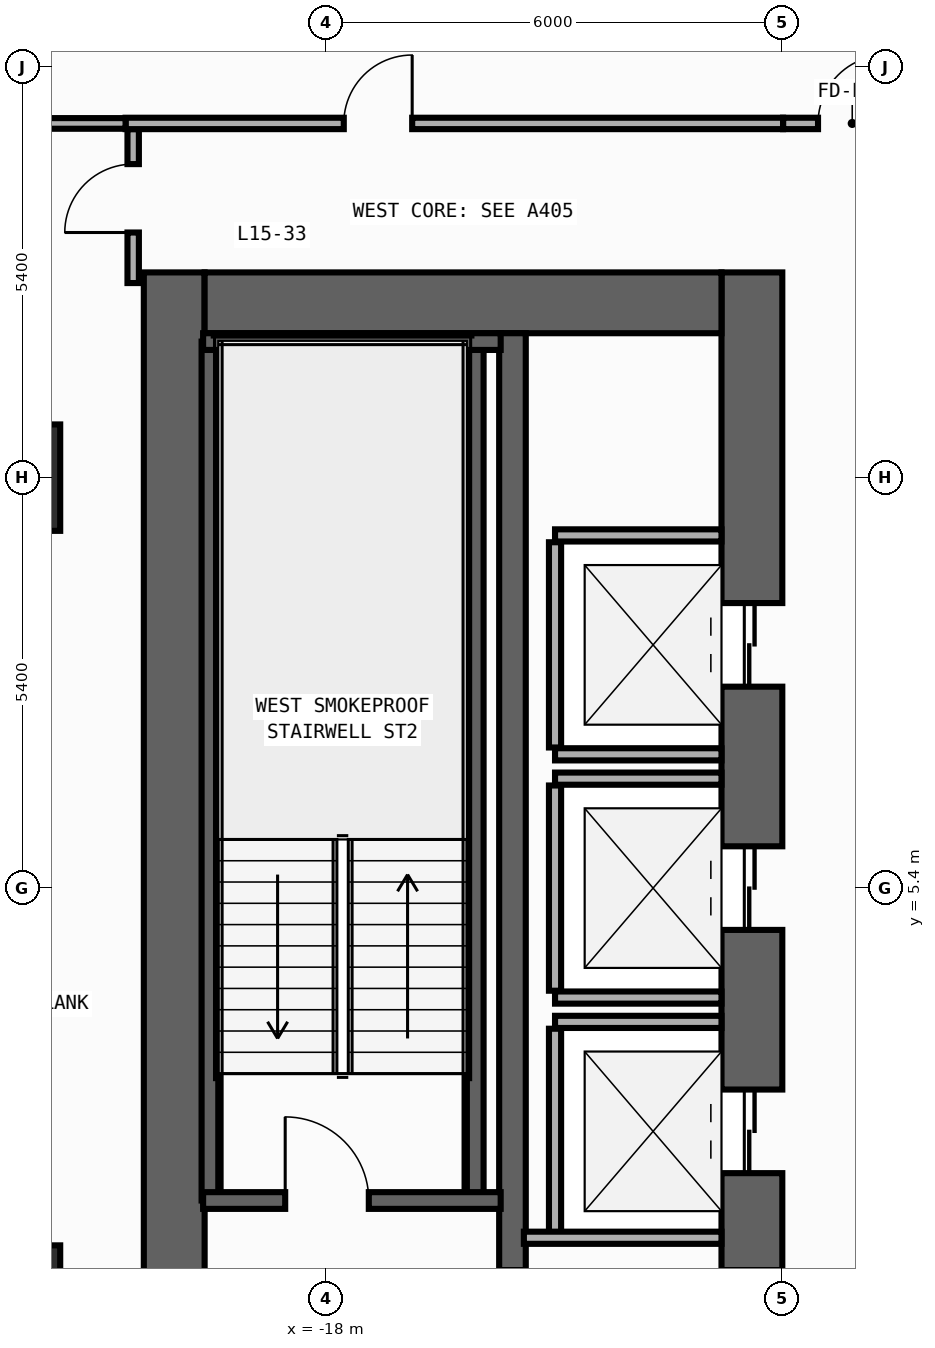
"""IFC4 building model, lengths in metres.
Left out: names, types, materials, properties, quantities, classifications, styles, units other than length and angle.
Written with IfcOpenShell. Run it as: python <this file> out.ifc"""

import sys

from ifc_helpers import new_model, si_unit, direction, frame, frame_2d, origin, origin_2d, place, context, subcontext, project, spatial, rectangle, extrude, element, fill, save


model = new_model("IFC4")
c1 = context("Model", 3, precision=1e-05, world=origin(), true_north=direction((0.0, 1.0)))
c2 = subcontext(c1, "Body", "Model", "MODEL_VIEW")
j1 = project(units=[si_unit("LENGTHUNIT", "METRE"), si_unit("PLANEANGLEUNIT", "RADIAN")], contexts=[c1])
p1 = place(None, origin())
s1 = spatial("IfcSite", under=j1, at=p1, CompositionType="ELEMENT")
p2 = place(p1, origin())
s2 = spatial("IfcBuilding", under=s1, at=p2, CompositionType="ELEMENT")
p3 = place(p2, frame((0.0, 0.0, 63.8)))
s3 = spatial("IfcBuildingStorey", under=s2, at=p3, CompositionType="ELEMENT", Elevation=63.8)
p4 = place(p3, frame((-20.0, -13.5, 0.0), z_axis=(0.0, 0.0, 1.0), x_axis=(0.0, 1.0, 0.0)))
e1 = element("IfcWall", 1, at=p4, inside=s3, PredefinedType="SHEAR", context=c2, shape_type="SweptSolid", body=[
    extrude(rectangle(XDim=27.0, YDim=0.8, at=frame_2d((13.5, 0.0))), origin(), (0.0, 0.0, 1.0), 3.94),
])
p5 = place(p3, frame((-12.4, -13.5, 0.0), z_axis=(0.0, 0.0, 1.0), x_axis=(0.0, 1.0, 0.0)))
e2 = element("IfcWall", 2, at=p5, inside=s3, PredefinedType="SHEAR", context=c2, shape_type="SweptSolid", body=[
    extrude(rectangle(XDim=27.0, YDim=0.8, at=frame_2d((13.5, 0.0))), origin(), (0.0, 0.0, 1.0), 3.94),
])
p6 = place(p5, frame((21.55, 0.0, 0.0)))
e3 = element("IfcOpeningElement", 3, at=p6, cuts=e2, PredefinedType="OPENING", context=c2, shape_type="SweptSolid", body=[
    extrude(rectangle(XDim=1.1, YDim=2.2, at=frame_2d((0.55, 1.1))), frame((0.0, 0.41, 0.0), z_axis=(0.0, -1.0, 0.0), x_axis=(1.0, 0.0, 0.0)), (0.0, 0.0, 1.0), 0.82),
])
p7 = place(p5, frame((18.35, 0.0, 0.0)))
e4 = element("IfcOpeningElement", 4, at=p7, cuts=e2, PredefinedType="OPENING", context=c2, shape_type="SweptSolid", body=[
    extrude(rectangle(XDim=1.1, YDim=2.2, at=frame_2d((0.55, 1.1))), frame((0.0, 0.41, 0.0), z_axis=(0.0, -1.0, 0.0), x_axis=(1.0, 0.0, 0.0)), (0.0, 0.0, 1.0), 0.82),
])
p8 = place(p5, frame((15.15, 0.0, 0.0)))
e5 = element("IfcOpeningElement", 5, at=p8, cuts=e2, PredefinedType="OPENING", context=c2, shape_type="SweptSolid", body=[
    extrude(rectangle(XDim=1.1, YDim=2.2, at=frame_2d((0.55, 1.1))), frame((0.0, 0.41, 0.0), z_axis=(0.0, -1.0, 0.0), x_axis=(1.0, 0.0, 0.0)), (0.0, 0.0, 1.0), 0.82),
])
p9 = place(p5, frame((10.35, 0.0, 0.0)))
e6 = element("IfcOpeningElement", 6, at=p9, cuts=e2, PredefinedType="OPENING", context=c2, shape_type="SweptSolid", body=[
    extrude(rectangle(XDim=1.1, YDim=2.2, at=frame_2d((0.55, 1.1))), frame((0.0, 0.41, 0.0), z_axis=(0.0, -1.0, 0.0), x_axis=(1.0, 0.0, 0.0)), (0.0, 0.0, 1.0), 0.82),
])
p10 = place(p5, frame((7.15, 0.0, 0.0)))
e7 = element("IfcOpeningElement", 7, at=p10, cuts=e2, PredefinedType="OPENING", context=c2, shape_type="SweptSolid", body=[
    extrude(rectangle(XDim=1.1, YDim=2.2, at=frame_2d((0.55, 1.1))), frame((0.0, 0.41, 0.0), z_axis=(0.0, -1.0, 0.0), x_axis=(1.0, 0.0, 0.0)), (0.0, 0.0, 1.0), 0.82),
])
p11 = place(p5, frame((3.95, 0.0, 0.0)))
e8 = element("IfcOpeningElement", 8, at=p11, cuts=e2, PredefinedType="OPENING", context=c2, shape_type="SweptSolid", body=[
    extrude(rectangle(XDim=1.1, YDim=2.2, at=frame_2d((0.55, 1.1))), frame((0.0, 0.41, 0.0), z_axis=(0.0, -1.0, 0.0), x_axis=(1.0, 0.0, 0.0)), (0.0, 0.0, 1.0), 0.82),
])
p12 = place(p5, frame((12.725, 0.0, 0.0)))
e9 = element("IfcOpeningElement", 9, at=p12, cuts=e2, PredefinedType="OPENING", context=c2, shape_type="SweptSolid", body=[
    extrude(rectangle(XDim=1.15, YDim=2.2, at=frame_2d((0.575, 1.1))), frame((0.0, 0.41, 0.0), z_axis=(0.0, -1.0, 0.0), x_axis=(1.0, 0.0, 0.0)), (0.0, 0.0, 1.0), 0.82),
])
p13 = place(p5, frame((1.625, 0.0, 0.0)))
e10 = element("IfcOpeningElement", 10, at=p13, cuts=e2, PredefinedType="OPENING", context=c2, shape_type="SweptSolid", body=[
    extrude(rectangle(XDim=0.85, YDim=2.1, at=frame_2d((0.425, 1.05))), frame((0.0, 0.41, 0.0), z_axis=(0.0, -1.0, 0.0), x_axis=(1.0, 0.0, 0.0)), (0.0, 0.0, 1.0), 0.82),
])
p14 = place(p3, frame((-19.6, 13.1, 0.0), z_axis=(0.0, 0.0, 1.0), x_axis=(1.0, 0.0, 0.0)))
e11 = element("IfcWall", 11, at=p14, inside=s3, PredefinedType="SHEAR", context=c2, shape_type="SweptSolid", body=[
    extrude(rectangle(XDim=6.8, YDim=0.8, at=frame_2d((3.4, 0.0))), origin(), (0.0, 0.0, 1.0), 3.94),
])
p15 = place(p3, frame((-15.55, -12.7, 0.0), z_axis=(0.0, 0.0, 1.0), x_axis=(0.0, 1.0, 0.0)))
e12 = element("IfcWall", 12, at=p15, inside=s3, PredefinedType="SHEAR", context=c2, shape_type="SweptSolid", body=[
    extrude(rectangle(XDim=25.4, YDim=0.35, at=frame_2d((12.7, 0.0))), origin(), (0.0, 0.0, 1.0), 3.94),
])
p16 = place(p15, frame((11.925, 0.0, 0.0)))
e13 = element("IfcOpeningElement", 13, at=p16, cuts=e12, PredefinedType="OPENING", context=c2, shape_type="SweptSolid", body=[
    extrude(rectangle(XDim=1.15, YDim=2.2, at=frame_2d((0.575, 1.1))), frame((0.0, 0.185, 0.0), z_axis=(0.0, -1.0, 0.0), x_axis=(1.0, 0.0, 0.0)), (0.0, 0.0, 1.0), 0.37),
])
p17 = place(p15, frame((0.825, 0.0, 0.0)))
e14 = element("IfcOpeningElement", 14, at=p17, cuts=e12, PredefinedType="OPENING", context=c2, shape_type="SweptSolid", body=[
    extrude(rectangle(XDim=0.85, YDim=2.1, at=frame_2d((0.425, 1.05))), frame((0.0, 0.185, 0.0), z_axis=(0.0, -1.0, 0.0), x_axis=(1.0, 0.0, 0.0)), (0.0, 0.0, 1.0), 0.37),
])
for number, where, z_axis, x_axis in (
    (15, (-16.04, 1.29, 0.0), (0.0, 0.0, 1.0), (0.0, 1.0, 0.0)),
    (16, (-19.53, 1.29, 0.0), (0.0, 0.0, 1.0), (0.0, 1.0, 0.0)),
):
    element("IfcWall", number, at=place(p3, frame(where, z_axis=z_axis, x_axis=x_axis)), inside=s3, PredefinedType="SHEAR", context=c2, shape_type="SweptSolid", body=[
        extrude(rectangle(XDim=11.3, YDim=0.22, at=frame_2d((5.65, 0.0))), origin(), (0.0, 0.0, 1.0), 3.94),
    ])
p18 = place(p3, frame((-19.62, 12.59, 0.0), z_axis=(0.0, 0.0, 1.0), x_axis=(1.0, 0.0, 0.0)))
e17 = element("IfcWall", 17, at=p18, inside=s3, PredefinedType="SHEAR", context=c2, shape_type="SweptSolid", body=[
    extrude(rectangle(XDim=3.915, YDim=0.22, at=frame_2d((1.958, 0.0))), origin(), (0.0, 0.0, 1.0), 3.94),
])
p19 = place(p3, frame((-19.62, 1.29, 0.0), z_axis=(0.0, 0.0, 1.0), x_axis=(1.0, 0.0, 0.0)))
e18 = element("IfcWall", 18, at=p19, inside=s3, PredefinedType="SHEAR", context=c2, shape_type="SweptSolid", body=[
    extrude(rectangle(XDim=3.915, YDim=0.22, at=frame_2d((1.958, 0.0))), origin(), (0.0, 0.0, 1.0), 3.94),
])
p20 = place(p19, frame((1.08, 0.0, 0.0)))
e19 = element("IfcOpeningElement", 19, at=p20, cuts=e18, PredefinedType="OPENING", context=c2, shape_type="SweptSolid", body=[
    extrude(rectangle(XDim=1.1, YDim=2.2, at=frame_2d((0.55, 1.1))), frame((0.0, 0.12, 0.0), z_axis=(0.0, -1.0, 0.0), x_axis=(1.0, 0.0, 0.0)), (0.0, 0.0, 1.0), 0.24),
])
for number, where, z_axis, x_axis in (
    (20, (-22.2, 0.0, 0.0), (0.0, 0.0, 1.0), (1.0, 0.0, 0.0)),
    (21, (-22.2, 10.8, 0.0), (0.0, 0.0, 1.0), (1.0, 0.0, 0.0)),
):
    element("IfcColumn", number, at=place(p3, frame(where, z_axis=z_axis, x_axis=x_axis)), inside=s3, PredefinedType="COLUMN", context=c2, shape_type="SweptSolid", body=[
        extrude(rectangle(XDim=1.4, YDim=1.4, at=origin_2d()), origin(), (0.0, 0.0, 1.0), 4.2),
    ])
for number, where, z_axis, x_axis in (
    (22, (-14.99, 7.16, 0.0), (0.0, 0.0, 1.0), (1.0, 0.0, 0.0)),
    (23, (-14.99, 10.04, 0.0), (0.0, 0.0, 1.0), (1.0, 0.0, 0.0)),
):
    element("IfcWall", number, at=place(p3, frame(where, z_axis=z_axis, x_axis=x_axis)), inside=s3, PredefinedType="STANDARD", context=c2, shape_type="SweptSolid", body=[
        extrude(rectangle(XDim=2.19, YDim=0.16, at=frame_2d((1.095, 0.0))), origin(), (0.0, 0.0, 1.0), 3.94),
    ])
p21 = place(p3, frame((-14.99, 7.25, 0.0), z_axis=(0.0, 0.0, 1.0), x_axis=(0.0, 1.0, 0.0)))
e24 = element("IfcWall", 24, at=p21, inside=s3, PredefinedType="STANDARD", context=c2, shape_type="SweptSolid", body=[
    extrude(rectangle(XDim=2.7, YDim=0.16, at=frame_2d((1.35, 0.0))), origin(), (0.0, 0.0, 1.0), 3.94),
])
for number, where, z_axis, x_axis in (
    (25, (-14.99, 3.96, 0.0), (0.0, 0.0, 1.0), (1.0, 0.0, 0.0)),
    (26, (-14.99, 6.84, 0.0), (0.0, 0.0, 1.0), (1.0, 0.0, 0.0)),
):
    element("IfcWall", number, at=place(p3, frame(where, z_axis=z_axis, x_axis=x_axis)), inside=s3, PredefinedType="STANDARD", context=c2, shape_type="SweptSolid", body=[
        extrude(rectangle(XDim=2.19, YDim=0.16, at=frame_2d((1.095, 0.0))), origin(), (0.0, 0.0, 1.0), 3.94),
    ])
p22 = place(p3, frame((-14.99, 4.05, 0.0), z_axis=(0.0, 0.0, 1.0), x_axis=(0.0, 1.0, 0.0)))
e27 = element("IfcWall", 27, at=p22, inside=s3, PredefinedType="STANDARD", context=c2, shape_type="SweptSolid", body=[
    extrude(rectangle(XDim=2.7, YDim=0.16, at=frame_2d((1.35, 0.0))), origin(), (0.0, 0.0, 1.0), 3.94),
])
p23 = place(p3, frame((-14.99, 3.64, 0.0), z_axis=(0.0, 0.0, 1.0), x_axis=(1.0, 0.0, 0.0)))
e28 = element("IfcWall", 28, at=p23, inside=s3, PredefinedType="STANDARD", context=c2, shape_type="SweptSolid", body=[
    extrude(rectangle(XDim=2.19, YDim=0.16, at=frame_2d((1.095, 0.0))), origin(), (0.0, 0.0, 1.0), 3.94),
])
p24 = place(p3, frame((-14.99, 0.85, 0.0), z_axis=(0.0, 0.0, 1.0), x_axis=(0.0, 1.0, 0.0)))
e29 = element("IfcWall", 29, at=p24, inside=s3, PredefinedType="STANDARD", context=c2, shape_type="SweptSolid", body=[
    extrude(rectangle(XDim=2.7, YDim=0.16, at=frame_2d((1.35, 0.0))), origin(), (0.0, 0.0, 1.0), 3.94),
])
p25 = place(p3, frame((-15.4, 0.8, 0.0), z_axis=(0.0, 0.0, 1.0), x_axis=(1.0, 0.0, 0.0)))
e30 = element("IfcWall", 30, at=p25, inside=s3, PredefinedType="STANDARD", context=c2, shape_type="SweptSolid", body=[
    extrude(rectangle(XDim=2.6, YDim=0.16, at=frame_2d((1.3, 0.0))), origin(), (0.0, 0.0, 1.0), 3.94),
])
p26 = place(p3, frame((-11.99, 15.46, 0.0), z_axis=(0.0, 0.0, 1.0), x_axis=(1.0, 0.0, 0.0)))
e31 = element("IfcWall", 31, at=p26, inside=s3, PredefinedType="PARTITIONING", context=c2, shape_type="SweptSolid", body=[
    extrude(rectangle(XDim=1.98, YDim=0.15, at=frame_2d((0.99, 0.0))), origin(), (0.0, 0.0, 1.0), 3.94),
])
p27 = place(p26, frame((0.46, 0.0, 0.0)))
e32 = element("IfcOpeningElement", 32, at=p27, cuts=e31, PredefinedType="OPENING", context=c2, shape_type="SweptSolid", body=[
    extrude(rectangle(XDim=0.9, YDim=2.15, at=frame_2d((0.45, 1.075))), frame((0.0, 0.085, 0.0), z_axis=(0.0, -1.0, 0.0), x_axis=(1.0, 0.0, 0.0)), (0.0, 0.0, 1.0), 0.17),
])
p28 = place(p3, frame((-20.54, 13.36, 0.0), z_axis=(0.0, 0.0, 1.0), x_axis=(0.0, 1.0, 0.0)))
e33 = element("IfcWall", 33, at=p28, inside=s3, PredefinedType="PARTITIONING", context=c2, shape_type="SweptSolid", body=[
    extrude(rectangle(XDim=2.025, YDim=0.15, at=frame_2d((1.012, 0.0))), origin(), (0.0, 0.0, 1.0), 3.94),
])
p29 = place(p28, frame((0.665, 0.0, 0.0)))
e34 = element("IfcOpeningElement", 34, at=p29, cuts=e33, PredefinedType="OPENING", context=c2, shape_type="SweptSolid", body=[
    extrude(rectangle(XDim=0.9, YDim=2.15, at=frame_2d((0.45, 1.075))), frame((0.0, 0.085, 0.0), z_axis=(0.0, -1.0, 0.0), x_axis=(1.0, 0.0, 0.0)), (0.0, 0.0, 1.0), 0.17),
])
p30 = place(p3, frame((-20.64, 15.46, 0.0), z_axis=(0.0, 0.0, 1.0), x_axis=(1.0, 0.0, 0.0)))
e35 = element("IfcWall", 35, at=p30, inside=s3, PredefinedType="PARTITIONING", context=c2, shape_type="SweptSolid", body=[
    extrude(rectangle(XDim=8.65, YDim=0.15, at=frame_2d((4.325, 0.0))), origin(), (0.0, 0.0, 1.0), 3.94),
])
p31 = place(p30, frame((2.871, 0.0, 0.0)))
e36 = element("IfcOpeningElement", 36, at=p31, cuts=e35, PredefinedType="OPENING", context=c2, shape_type="SweptSolid", body=[
    extrude(rectangle(XDim=0.9, YDim=2.15, at=frame_2d((0.45, 1.075))), frame((0.0, 0.085, 0.0), z_axis=(0.0, -1.0, 0.0), x_axis=(1.0, 0.0, 0.0)), (0.0, 0.0, 1.0), 0.17),
])
p32 = place(p3, frame((-24.055, 15.46, 0.0), z_axis=(0.0, 0.0, 1.0), x_axis=(1.0, 0.0, 0.0)))
e37 = element("IfcWall", 37, at=p32, inside=s3, PredefinedType="PARTITIONING", context=c2, shape_type="SweptSolid", body=[
    extrude(rectangle(XDim=3.415, YDim=0.14, at=frame_2d((1.708, 0.0))), origin(), (0.0, 0.0, 1.0), 3.94),
])
p33 = place(p20, origin())
e38 = element("IfcDoor", 38, at=p33, inside=s3, OperationType="SINGLE_SWING_LEFT", PredefinedType="DOOR", context=c2, shape_type="SweptSolid", body=[
    extrude(rectangle(XDim=1.1, YDim=2.2, at=frame_2d((0.55, 1.1))), frame((0.0, 0.025, 0.0), z_axis=(0.0, -1.0, 0.0), x_axis=(1.0, 0.0, 0.0)), (0.0, 0.0, 1.0), 0.05),
])
fill(e19, e38)
p34 = place(p6, origin())
e39 = element("IfcDoor", 39, at=p34, inside=s3, OperationType="DOUBLE_DOOR_SLIDING", PredefinedType="DOOR", context=c2, shape_type="SweptSolid", body=[
    extrude(rectangle(XDim=1.1, YDim=2.2, at=frame_2d((0.55, 1.1))), frame((0.0, 0.025, 0.0), z_axis=(0.0, -1.0, 0.0), x_axis=(1.0, 0.0, 0.0)), (0.0, 0.0, 1.0), 0.05),
])
fill(e3, e39)
p35 = place(p7, origin())
e40 = element("IfcDoor", 40, at=p35, inside=s3, OperationType="DOUBLE_DOOR_SLIDING", PredefinedType="DOOR", context=c2, shape_type="SweptSolid", body=[
    extrude(rectangle(XDim=1.1, YDim=2.2, at=frame_2d((0.55, 1.1))), frame((0.0, 0.025, 0.0), z_axis=(0.0, -1.0, 0.0), x_axis=(1.0, 0.0, 0.0)), (0.0, 0.0, 1.0), 0.05),
])
fill(e4, e40)
p36 = place(p8, origin())
e41 = element("IfcDoor", 41, at=p36, inside=s3, OperationType="DOUBLE_DOOR_SLIDING", PredefinedType="DOOR", context=c2, shape_type="SweptSolid", body=[
    extrude(rectangle(XDim=1.1, YDim=2.2, at=frame_2d((0.55, 1.1))), frame((0.0, 0.025, 0.0), z_axis=(0.0, -1.0, 0.0), x_axis=(1.0, 0.0, 0.0)), (0.0, 0.0, 1.0), 0.05),
])
fill(e5, e41)
p37 = place(p27, origin())
e42 = element("IfcDoor", 42, at=p37, inside=s3, OperationType="SINGLE_SWING_RIGHT", PredefinedType="DOOR", context=c2, shape_type="SweptSolid", body=[
    extrude(rectangle(XDim=0.9, YDim=2.15, at=frame_2d((0.45, 1.075))), frame((0.0, 0.025, 0.0), z_axis=(0.0, -1.0, 0.0), x_axis=(1.0, 0.0, 0.0)), (0.0, 0.0, 1.0), 0.05),
])
fill(e32, e42)
p38 = place(p29, origin())
e43 = element("IfcDoor", 43, at=p38, inside=s3, OperationType="SINGLE_SWING_LEFT", PredefinedType="DOOR", context=c2, shape_type="SweptSolid", body=[
    extrude(rectangle(XDim=0.9, YDim=2.15, at=frame_2d((0.45, 1.075))), frame((0.0, 0.025, 0.0), z_axis=(0.0, -1.0, 0.0), x_axis=(1.0, 0.0, 0.0)), (0.0, 0.0, 1.0), 0.05),
])
fill(e34, e43)
p39 = place(p31, origin())
e44 = element("IfcDoor", 44, at=p39, inside=s3, OperationType="SINGLE_SWING_RIGHT", PredefinedType="DOOR", context=c2, shape_type="SweptSolid", body=[
    extrude(rectangle(XDim=0.9, YDim=2.15, at=frame_2d((0.45, 1.075))), frame((0.0, 0.025, 0.0), z_axis=(0.0, -1.0, 0.0), x_axis=(1.0, 0.0, 0.0)), (0.0, 0.0, 1.0), 0.05),
])
fill(e36, e44)
save(model, sys.argv[1])
